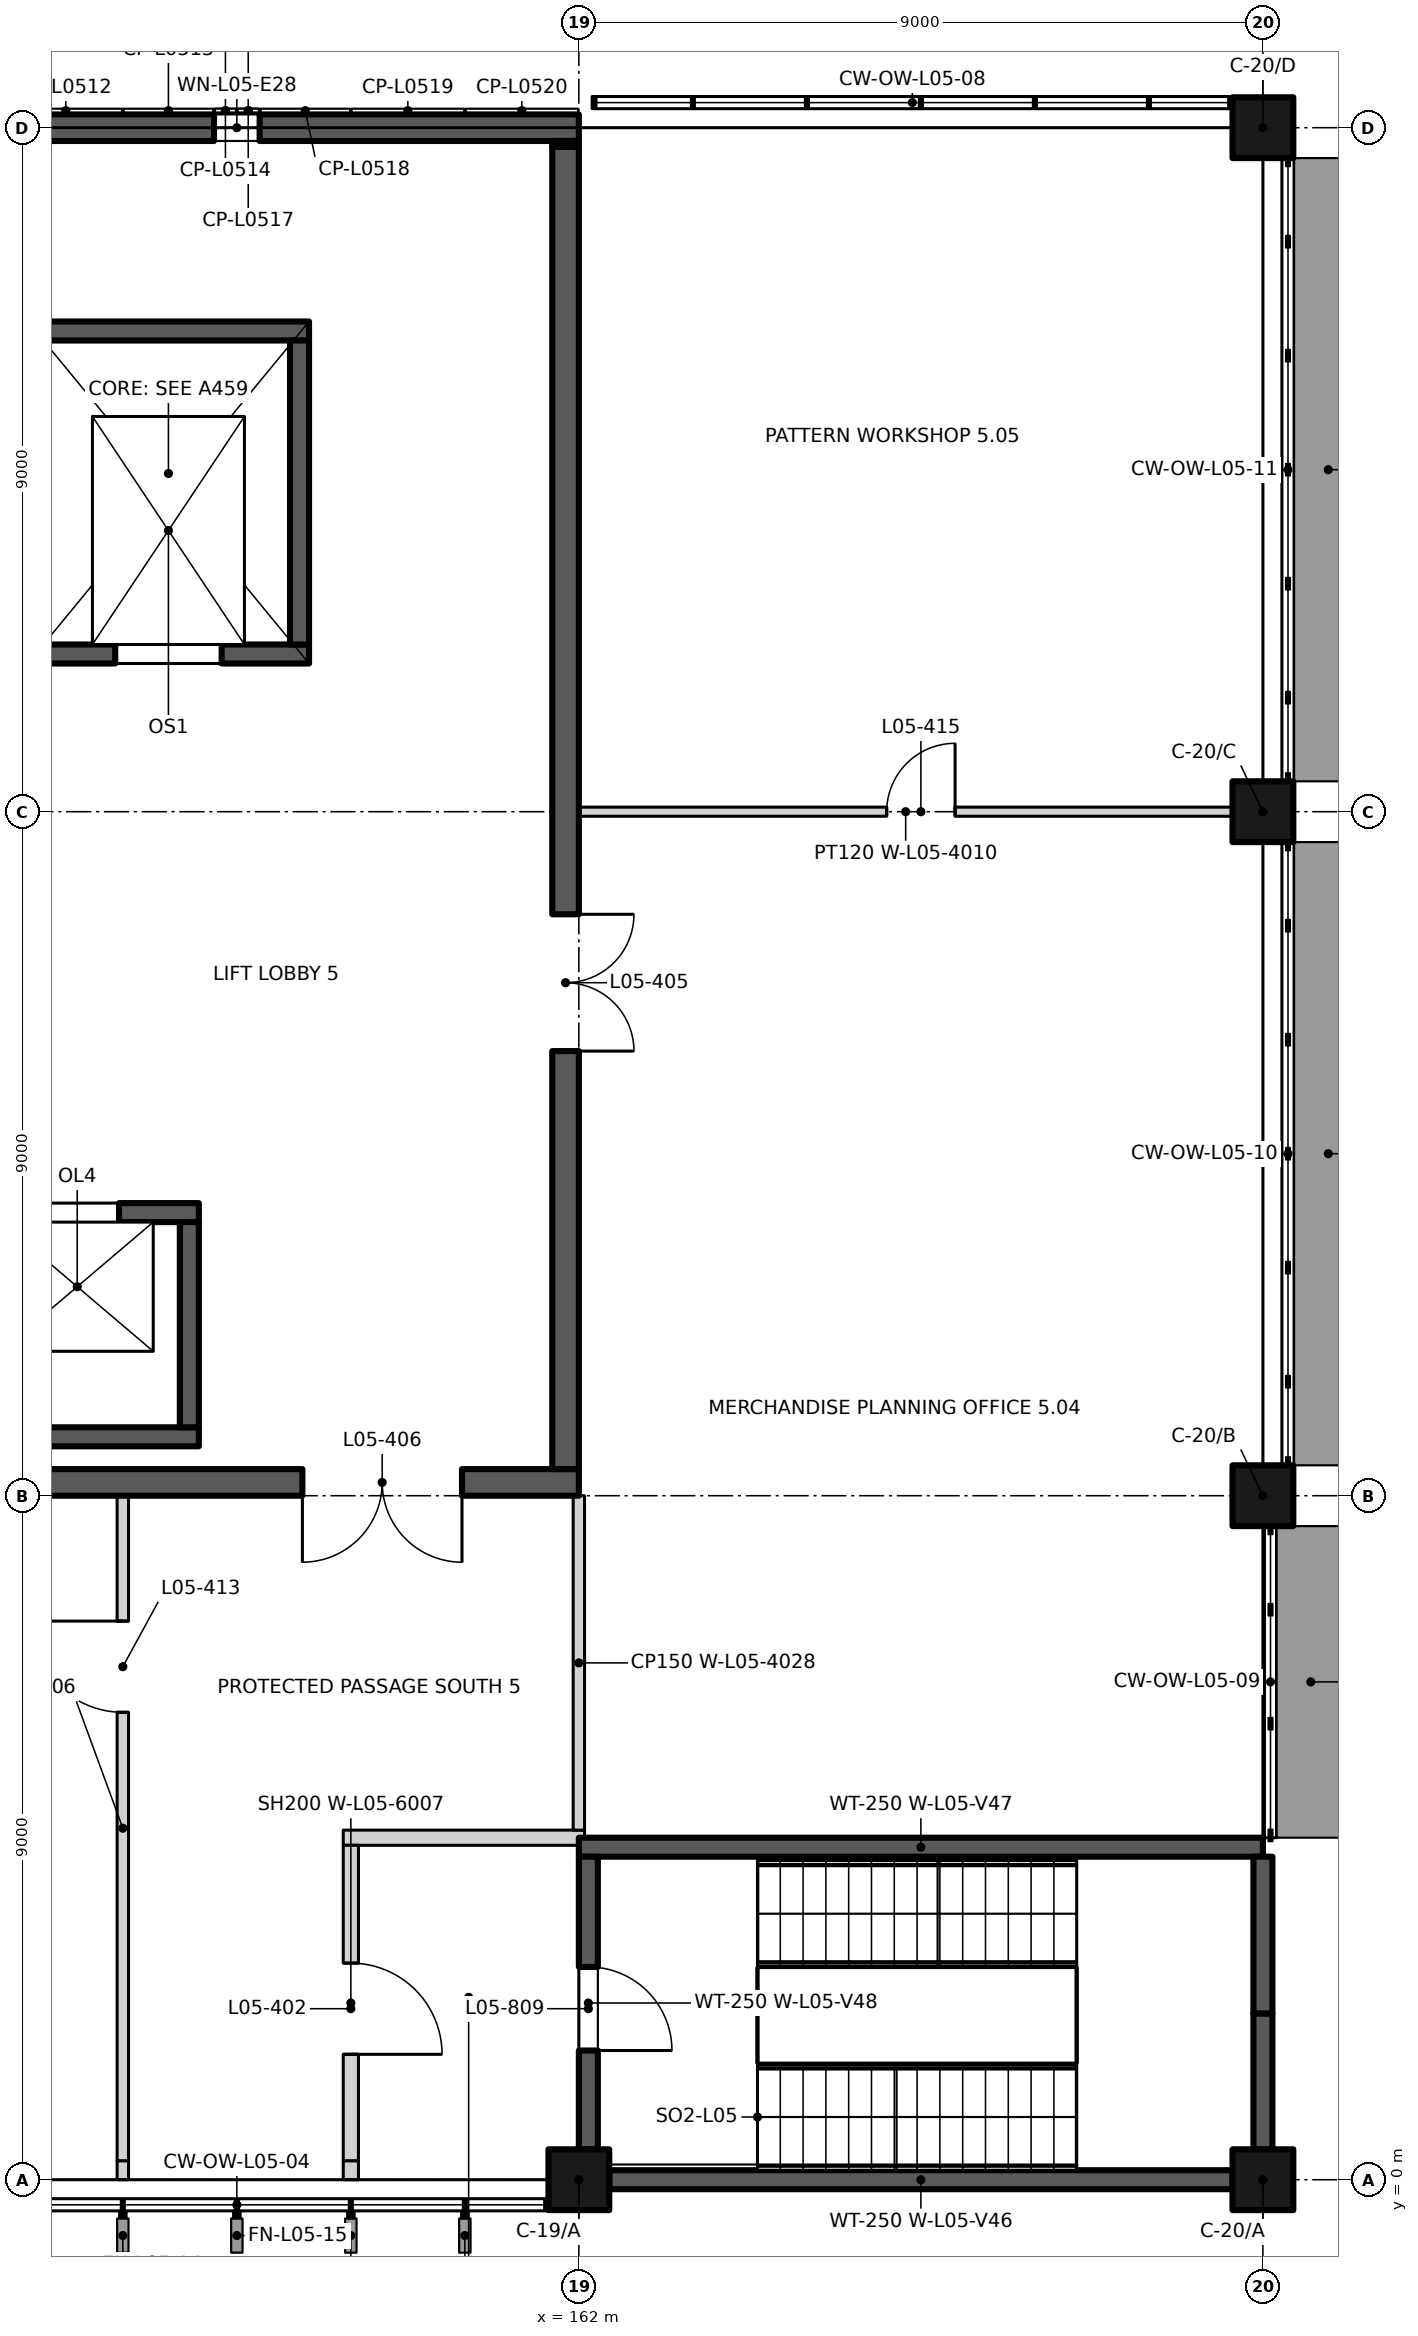
"""IFC4 building model, lengths in metres.
Left out: names, types, materials, properties, quantities, classifications, styles, units other than length and angle.
Written with IfcOpenShell. Run it as: python <this file> out.ifc"""

import sys

from ifc_helpers import new_model, si_unit, direction, frame, frame_2d, origin, origin_2d, place, context, subcontext, project, spatial, rectangle, extrude, element, fill, save


model = new_model("IFC4")
c1 = context("Model", 3, precision=1e-05, world=origin(), true_north=direction((0.0, 1.0)))
c2 = subcontext(c1, "Body", "Model", "MODEL_VIEW")
j1 = project(units=[si_unit("LENGTHUNIT", "METRE"), si_unit("PLANEANGLEUNIT", "RADIAN")], contexts=[c1])
p1 = place(None, origin())
s1 = spatial("IfcSite", under=j1, at=p1, CompositionType="ELEMENT")
p2 = place(p1, origin())
s2 = spatial("IfcBuilding", under=s1, at=p2, CompositionType="ELEMENT")
p3 = place(p2, frame((0.0, 0.0, 24.0)))
s3 = spatial("IfcBuildingStorey", under=s2, at=p3, CompositionType="ELEMENT", Elevation=24.0)
for number, where, z_axis, x_axis in (
    (1, (162.0, 0.0, 0.0), (0.0, 0.0, 1.0), (1.0, 0.0, 0.0)),
    (2, (171.0, 0.0, 0.0), (0.0, 0.0, 1.0), (1.0, 0.0, 0.0)),
    (3, (171.0, 9.0, 0.0), (0.0, 0.0, 1.0), (1.0, 0.0, 0.0)),
    (4, (171.0, 18.0, 0.0), (0.0, 0.0, 1.0), (1.0, 0.0, 0.0)),
    (5, (171.0, 27.0, 0.0), (0.0, 0.0, 1.0), (1.0, 0.0, 0.0)),
):
    element("IfcColumn", number, at=place(p3, frame(where, z_axis=z_axis, x_axis=x_axis)), inside=s3, PredefinedType="COLUMN", context=c2, shape_type="SweptSolid", body=[
        extrude(rectangle(XDim=0.8, YDim=0.8, at=origin_2d()), origin(), (0.0, 0.0, 1.0), 4.5),
    ])
p4 = place(p3, frame((162.4, 0.0, 0.0), z_axis=(0.0, 0.0, 1.0), x_axis=(1.0, 0.0, 0.0)))
e6 = element("IfcWall", 6, at=p4, inside=s3, PredefinedType="SHEAR", context=c2, shape_type="SweptSolid", body=[
    extrude(rectangle(XDim=8.2, YDim=0.25, at=frame_2d((4.1, 0.0))), origin(), (0.0, 0.0, 1.0), 4.5),
])
p5 = place(p3, frame((162.0, 4.375, 0.0), z_axis=(0.0, 0.0, 1.0), x_axis=(1.0, 0.0, 0.0)))
e7 = element("IfcWall", 7, at=p5, inside=s3, PredefinedType="SHEAR", context=c2, shape_type="SweptSolid", body=[
    extrude(rectangle(XDim=9.0, YDim=0.25, at=frame_2d((4.5, 0.0))), origin(), (0.0, 0.0, 1.0), 4.5),
])
p6 = place(p3, frame((162.125, 0.4, 0.0), z_axis=(0.0, 0.0, 1.0), x_axis=(0.0, 1.0, 0.0)))
e8 = element("IfcWall", 8, at=p6, inside=s3, PredefinedType="SHEAR", context=c2, shape_type="SweptSolid", body=[
    extrude(rectangle(XDim=3.85, YDim=0.25, at=frame_2d((1.925, 0.0))), origin(), (0.0, 0.0, 1.0), 4.5),
])
p7 = place(p6, frame((2.4, 0.0, 0.0), z_axis=(0.0, 0.0, 1.0), x_axis=(-1.0, 0.0, 0.0)))
e9 = element("IfcOpeningElement", 9, at=p7, cuts=e8, PredefinedType="OPENING", context=c2, shape_type="SweptSolid", body=[
    extrude(rectangle(XDim=1.1, YDim=2.1, at=frame_2d((0.55, 1.05))), frame((0.0, 0.135, 0.0), z_axis=(0.0, -1.0, 0.0), x_axis=(1.0, 0.0, 0.0)), (0.0, 0.0, 1.0), 0.27),
])
p8 = place(p3, frame((171.0, 0.4, 0.0), z_axis=(0.0, 0.0, 1.0), x_axis=(0.0, 1.0, 0.0)))
e10 = element("IfcWall", 10, at=p8, inside=s3, PredefinedType="SHEAR", context=c2, shape_type="SweptSolid", body=[
    extrude(rectangle(XDim=1.788, YDim=0.25, at=frame_2d((0.894, 0.0))), origin(), (0.0, 0.0, 1.0), 4.5),
])
p9 = place(p3, frame((171.0, 2.188, 0.0), z_axis=(0.0, 0.0, 1.0), x_axis=(0.0, 1.0, 0.0)))
e11 = element("IfcWall", 11, at=p9, inside=s3, PredefinedType="SHEAR", context=c2, shape_type="SweptSolid", body=[
    extrude(rectangle(XDim=2.062, YDim=0.25, at=frame_2d((1.031, 0.0))), origin(), (0.0, 0.0, 1.0), 4.5),
])
p10 = place(p3, frame((144.95, 12.725, 0.0), z_axis=(0.0, 0.0, 1.0), x_axis=(1.0, 0.0, 0.0)))
e12 = element("IfcWall", 12, at=p10, inside=s3, PredefinedType="SHEAR", context=c2, shape_type="SweptSolid", body=[
    extrude(rectangle(XDim=12.05, YDim=0.25, at=frame_2d((6.025, 0.0))), origin(), (0.0, 0.0, 1.0), 4.5),
])
p11 = place(p10, frame((1.05, 0.0, 0.0)))
e13 = element("IfcOpeningElement", 13, at=p11, cuts=e12, PredefinedType="OPENING", context=c2, shape_type="SweptSolid", body=[
    extrude(rectangle(XDim=1.1, YDim=2.1, at=frame_2d((0.55, 1.05))), frame((0.0, 0.135, 0.0), z_axis=(0.0, -1.0, 0.0), x_axis=(1.0, 0.0, 0.0)), (0.0, 0.0, 1.0), 0.27),
])
p12 = place(p10, frame((4.0, 0.0, 0.0)))
e14 = element("IfcOpeningElement", 14, at=p12, cuts=e12, PredefinedType="OPENING", context=c2, shape_type="SweptSolid", body=[
    extrude(rectangle(XDim=1.1, YDim=2.1, at=frame_2d((0.55, 1.05))), frame((0.0, 0.135, 0.0), z_axis=(0.0, -1.0, 0.0), x_axis=(1.0, 0.0, 0.0)), (0.0, 0.0, 1.0), 0.27),
])
p13 = place(p10, frame((6.95, 0.0, 0.0)))
e15 = element("IfcOpeningElement", 15, at=p13, cuts=e12, PredefinedType="OPENING", context=c2, shape_type="SweptSolid", body=[
    extrude(rectangle(XDim=1.1, YDim=2.1, at=frame_2d((0.55, 1.05))), frame((0.0, 0.135, 0.0), z_axis=(0.0, -1.0, 0.0), x_axis=(1.0, 0.0, 0.0)), (0.0, 0.0, 1.0), 0.27),
])
p14 = place(p10, frame((9.9, 0.0, 0.0)))
e16 = element("IfcOpeningElement", 16, at=p14, cuts=e12, PredefinedType="OPENING", context=c2, shape_type="SweptSolid", body=[
    extrude(rectangle(XDim=1.1, YDim=2.1, at=frame_2d((0.55, 1.05))), frame((0.0, 0.135, 0.0), z_axis=(0.0, -1.0, 0.0), x_axis=(1.0, 0.0, 0.0)), (0.0, 0.0, 1.0), 0.27),
])
p15 = place(p3, frame((144.95, 9.775, 0.0), z_axis=(0.0, 0.0, 1.0), x_axis=(1.0, 0.0, 0.0)))
e17 = element("IfcWall", 17, at=p15, inside=s3, PredefinedType="SHEAR", context=c2, shape_type="SweptSolid", body=[
    extrude(rectangle(XDim=12.05, YDim=0.25, at=frame_2d((6.025, 0.0))), origin(), (0.0, 0.0, 1.0), 4.5),
])
p16 = place(p3, frame((156.875, 9.9, 0.0), z_axis=(0.0, 0.0, 1.0), x_axis=(0.0, 1.0, 0.0)))
e18 = element("IfcWall", 18, at=p16, inside=s3, PredefinedType="SHEAR", context=c2, shape_type="SweptSolid", body=[
    extrude(rectangle(XDim=2.7, YDim=0.25, at=frame_2d((1.35, 0.0))), origin(), (0.0, 0.0, 1.0), 4.5),
])
p17 = place(p3, frame((154.75, 20.075, 0.0), z_axis=(0.0, 0.0, 1.0), x_axis=(1.0, 0.0, 0.0)))
e19 = element("IfcWall", 19, at=p17, inside=s3, PredefinedType="SHEAR", context=c2, shape_type="SweptSolid", body=[
    extrude(rectangle(XDim=3.7, YDim=0.25, at=frame_2d((1.85, 0.0))), origin(), (0.0, 0.0, 1.0), 4.5),
])
p18 = place(p17, frame((1.15, 0.0, 0.0)))
e20 = element("IfcOpeningElement", 20, at=p18, cuts=e19, PredefinedType="OPENING", context=c2, shape_type="SweptSolid", body=[
    extrude(rectangle(XDim=1.4, YDim=2.1, at=frame_2d((0.7, 1.05))), frame((0.0, 0.135, 0.0), z_axis=(0.0, -1.0, 0.0), x_axis=(1.0, 0.0, 0.0)), (0.0, 0.0, 1.0), 0.27),
])
p19 = place(p3, frame((154.75, 24.325, 0.0), z_axis=(0.0, 0.0, 1.0), x_axis=(1.0, 0.0, 0.0)))
e21 = element("IfcWall", 21, at=p19, inside=s3, PredefinedType="SHEAR", context=c2, shape_type="SweptSolid", body=[
    extrude(rectangle(XDim=3.7, YDim=0.25, at=frame_2d((1.85, 0.0))), origin(), (0.0, 0.0, 1.0), 4.5),
])
p20 = place(p3, frame((158.325, 20.2, 0.0), z_axis=(0.0, 0.0, 1.0), x_axis=(0.0, 1.0, 0.0)))
e22 = element("IfcWall", 22, at=p20, inside=s3, PredefinedType="SHEAR", context=c2, shape_type="SweptSolid", body=[
    extrude(rectangle(XDim=4.0, YDim=0.25, at=frame_2d((2.0, 0.0))), origin(), (0.0, 0.0, 1.0), 4.5),
])
p21 = place(p3, frame((144.0, 27.0, 0.0), z_axis=(0.0, 0.0, 1.0), x_axis=(1.0, 0.0, 0.0)))
e23 = element("IfcWall", 23, at=p21, inside=s3, PredefinedType="SOLIDWALL", context=c2, shape_type="SweptSolid", body=[
    extrude(rectangle(XDim=18.0, YDim=0.35, at=frame_2d((9.0, 0.0))), origin(), (0.0, 0.0, 1.0), 3.6),
])
p22 = place(p21, frame((4.2, 0.0, 0.6)))
e24 = element("IfcOpeningElement", 24, at=p22, cuts=e23, PredefinedType="OPENING", context=c2, shape_type="SweptSolid", body=[
    extrude(rectangle(XDim=0.6, YDim=2.4, at=frame_2d((0.3, 1.2))), frame((0.0, 0.185, 0.0), z_axis=(0.0, -1.0, 0.0), x_axis=(1.0, 0.0, 0.0)), (0.0, 0.0, 1.0), 0.37),
])
p23 = place(p21, frame((13.2, 0.0, 0.6)))
e25 = element("IfcOpeningElement", 25, at=p23, cuts=e23, PredefinedType="OPENING", context=c2, shape_type="SweptSolid", body=[
    extrude(rectangle(XDim=0.6, YDim=2.4, at=frame_2d((0.3, 1.2))), frame((0.0, 0.185, 0.0), z_axis=(0.0, -1.0, 0.0), x_axis=(1.0, 0.0, 0.0)), (0.0, 0.0, 1.0), 0.37),
])
p24 = place(p3, frame((158.9, 4.5, 0.0), z_axis=(0.0, 0.0, 1.0), x_axis=(1.0, 0.0, 0.0)))
e26 = element("IfcWall", 26, at=p24, inside=s3, PredefinedType="PARTITIONING", context=c2, shape_type="SweptSolid", body=[
    extrude(rectangle(XDim=3.175, YDim=0.2, at=frame_2d((1.587, 0.0))), origin(), (0.0, 0.0, 1.0), 4.2),
])
p25 = place(p3, frame((144.0, 9.175, 0.0), z_axis=(0.0, 0.0, 1.0), x_axis=(1.0, 0.0, 0.0)))
e27 = element("IfcWall", 27, at=p25, inside=s3, PredefinedType="SHEAR", context=c2, shape_type="SweptSolid", body=[
    extrude(rectangle(XDim=18.0, YDim=0.35, at=frame_2d((9.0, 0.0))), origin(), (0.0, 0.0, 1.0), 4.2),
])
p26 = place(p25, frame((16.463, 0.0, 0.0), z_axis=(0.0, 0.0, 1.0), x_axis=(-1.0, 0.0, 0.0)))
e28 = element("IfcOpeningElement", 28, at=p26, cuts=e27, PredefinedType="OPENING", context=c2, shape_type="SweptSolid", body=[
    extrude(rectangle(XDim=2.1, YDim=2.4, at=frame_2d((1.05, 1.2))), frame((0.0, 0.185, 0.0), z_axis=(0.0, -1.0, 0.0), x_axis=(1.0, 0.0, 0.0)), (0.0, 0.0, 1.0), 0.37),
])
p27 = place(p3, frame((162.0, 18.0, 0.0), z_axis=(0.0, 0.0, 1.0), x_axis=(1.0, 0.0, 0.0)))
e29 = element("IfcWall", 29, at=p27, inside=s3, PredefinedType="PARTITIONING", context=c2, shape_type="SweptSolid", body=[
    extrude(rectangle(XDim=8.6, YDim=0.12, at=frame_2d((4.3, 0.0))), origin(), (0.0, 0.0, 1.0), 4.2),
])
p28 = place(p27, frame((4.05, 0.0, 0.0)))
e30 = element("IfcOpeningElement", 30, at=p28, cuts=e29, PredefinedType="OPENING", context=c2, shape_type="SweptSolid", body=[
    extrude(rectangle(XDim=0.9, YDim=2.1, at=frame_2d((0.45, 1.05))), frame((0.0, 0.07, 0.0), z_axis=(0.0, -1.0, 0.0), x_axis=(1.0, 0.0, 0.0)), (0.0, 0.0, 1.0), 0.14),
])
p29 = place(p3, frame((156.0, 0.0, 0.0), z_axis=(0.0, 0.0, 1.0), x_axis=(0.0, 1.0, 0.0)))
e31 = element("IfcWall", 31, at=p29, inside=s3, PredefinedType="PARTITIONING", context=c2, shape_type="SweptSolid", body=[
    extrude(rectangle(XDim=0.25, YDim=0.15, at=frame_2d((0.125, 0.0))), origin(), (0.0, 0.0, 1.0), 3.6),
])
p30 = place(p3, frame((156.0, 0.25, 0.0), z_axis=(0.0, 0.0, 1.0), x_axis=(0.0, 1.0, 0.0)))
e32 = element("IfcWall", 32, at=p30, inside=s3, PredefinedType="PARTITIONING", context=c2, shape_type="SweptSolid", body=[
    extrude(rectangle(XDim=8.75, YDim=0.15, at=frame_2d((4.375, 0.0))), origin(), (0.0, 0.0, 1.0), 4.2),
])
p31 = place(p30, frame((5.9, 0.0, 0.0)))
e33 = element("IfcOpeningElement", 33, at=p31, cuts=e32, PredefinedType="OPENING", context=c2, shape_type="SweptSolid", body=[
    extrude(rectangle(XDim=1.2, YDim=2.1, at=frame_2d((0.6, 1.05))), frame((0.0, 0.085, 0.0), z_axis=(0.0, -1.0, 0.0), x_axis=(1.0, 0.0, 0.0)), (0.0, 0.0, 1.0), 0.17),
])
p32 = place(p3, frame((159.0, 0.0, 0.0), z_axis=(0.0, 0.0, 1.0), x_axis=(0.0, 1.0, 0.0)))
e34 = element("IfcWall", 34, at=p32, inside=s3, PredefinedType="PARTITIONING", context=c2, shape_type="SweptSolid", body=[
    extrude(rectangle(XDim=0.25, YDim=0.2, at=frame_2d((0.125, 0.0))), origin(), (0.0, 0.0, 1.0), 3.6),
])
p33 = place(p3, frame((159.0, 0.25, 0.0), z_axis=(0.0, 0.0, 1.0), x_axis=(0.0, 1.0, 0.0)))
e35 = element("IfcWall", 35, at=p33, inside=s3, PredefinedType="PARTITIONING", context=c2, shape_type="SweptSolid", body=[
    extrude(rectangle(XDim=4.15, YDim=0.2, at=frame_2d((2.075, 0.0))), origin(), (0.0, 0.0, 1.0), 4.2),
])
p34 = place(p33, frame((2.6, 0.0, 0.0), z_axis=(0.0, 0.0, 1.0), x_axis=(-1.0, 0.0, 0.0)))
e36 = element("IfcOpeningElement", 36, at=p34, cuts=e35, PredefinedType="OPENING", context=c2, shape_type="SweptSolid", body=[
    extrude(rectangle(XDim=1.2, YDim=2.1, at=frame_2d((0.6, 1.05))), frame((0.0, 0.11, 0.0), z_axis=(0.0, -1.0, 0.0), x_axis=(1.0, 0.0, 0.0)), (0.0, 0.0, 1.0), 0.22),
])
p35 = place(p3, frame((161.825, 9.35, 0.0), z_axis=(0.0, 0.0, 1.0), x_axis=(0.0, 1.0, 0.0)))
e37 = element("IfcWall", 37, at=p35, inside=s3, PredefinedType="SHEAR", context=c2, shape_type="SweptSolid", body=[
    extrude(rectangle(XDim=17.4, YDim=0.35, at=frame_2d((8.7, 0.0))), origin(), (0.0, 0.0, 1.0), 4.2),
])
p36 = place(p35, frame((7.3, 0.0, 0.0), z_axis=(0.0, 0.0, 1.0), x_axis=(-1.0, 0.0, 0.0)))
e38 = element("IfcOpeningElement", 38, at=p36, cuts=e37, PredefinedType="OPENING", context=c2, shape_type="SweptSolid", body=[
    extrude(rectangle(XDim=1.8, YDim=2.4, at=frame_2d((0.9, 1.2))), frame((0.0, 0.185, 0.0), z_axis=(0.0, -1.0, 0.0), x_axis=(1.0, 0.0, 0.0)), (0.0, 0.0, 1.0), 0.37),
])
p37 = place(p3, frame((161.825, 26.75, 0.0), z_axis=(0.0, 0.0, 1.0), x_axis=(0.0, 1.0, 0.0)))
e39 = element("IfcWall", 39, at=p37, inside=s3, PredefinedType="SHEAR", context=c2, shape_type="SweptSolid", body=[
    extrude(rectangle(XDim=0.075, YDim=0.35, at=frame_2d((0.038, 0.0))), origin(), (0.0, 0.0, 1.0), 3.6),
])
p38 = place(p3, frame((162.0, 4.6, 0.0), z_axis=(0.0, 0.0, 1.0), x_axis=(0.0, 1.0, 0.0)))
e40 = element("IfcWall", 40, at=p38, inside=s3, PredefinedType="PARTITIONING", context=c2, shape_type="SweptSolid", body=[
    extrude(rectangle(XDim=4.4, YDim=0.15, at=frame_2d((2.2, 0.0))), origin(), (0.0, 0.0, 1.0), 4.2),
])
p39 = place(p7, origin())
e41 = element("IfcDoor", 41, at=p39, inside=s3, OperationType="SINGLE_SWING_RIGHT", PredefinedType="DOOR", context=c2, shape_type="SweptSolid", body=[
    extrude(rectangle(XDim=1.1, YDim=2.1, at=frame_2d((0.55, 1.05))), frame((0.0, 0.025, 0.0), z_axis=(0.0, -1.0, 0.0), x_axis=(1.0, 0.0, 0.0)), (0.0, 0.0, 1.0), 0.05),
])
fill(e9, e41)
p40 = place(p14, origin())
e42 = element("IfcDoor", 42, at=p40, inside=s3, OperationType="DOUBLE_DOOR_SLIDING", PredefinedType="DOOR", context=c2, shape_type="SweptSolid", body=[
    extrude(rectangle(XDim=1.1, YDim=2.1, at=frame_2d((0.55, 1.05))), frame((0.0, 0.025, 0.0), z_axis=(0.0, -1.0, 0.0), x_axis=(1.0, 0.0, 0.0)), (0.0, 0.0, 1.0), 0.05),
])
fill(e16, e42)
p41 = place(p18, origin())
e43 = element("IfcDoor", 43, at=p41, inside=s3, OperationType="DOUBLE_DOOR_SLIDING", PredefinedType="DOOR", context=c2, shape_type="SweptSolid", body=[
    extrude(rectangle(XDim=1.4, YDim=2.1, at=frame_2d((0.7, 1.05))), frame((0.0, 0.025, 0.0), z_axis=(0.0, -1.0, 0.0), x_axis=(1.0, 0.0, 0.0)), (0.0, 0.0, 1.0), 0.05),
])
fill(e20, e43)
p42 = place(p23, origin())
e44 = element("IfcWindow", 44, at=p42, inside=s3, PartitioningType="SINGLE_PANEL", PredefinedType="WINDOW", context=c2, shape_type="SweptSolid", body=[
    extrude(rectangle(XDim=0.6, YDim=2.4, at=frame_2d((0.3, 1.2))), frame((0.0, -0.005, 0.0), z_axis=(0.0, -1.0, 0.0), x_axis=(1.0, 0.0, 0.0)), (0.0, 0.0, 1.0), 0.06),
])
fill(e25, e44)
p43 = place(p34, origin())
e45 = element("IfcDoor", 45, at=p43, inside=s3, OperationType="SINGLE_SWING_RIGHT", PredefinedType="DOOR", context=c2, shape_type="SweptSolid", body=[
    extrude(rectangle(XDim=1.2, YDim=2.1, at=frame_2d((0.6, 1.05))), frame((0.0, 0.025, 0.0), z_axis=(0.0, -1.0, 0.0), x_axis=(1.0, 0.0, 0.0)), (0.0, 0.0, 1.0), 0.05),
])
fill(e36, e45)
p44 = place(p36, origin())
e46 = element("IfcDoor", 46, at=p44, inside=s3, OperationType="DOUBLE_DOOR_SINGLE_SWING", PredefinedType="DOOR", context=c2, shape_type="SweptSolid", body=[
    extrude(rectangle(XDim=1.8, YDim=2.4, at=frame_2d((0.9, 1.2))), frame((0.0, 0.025, 0.0), z_axis=(0.0, -1.0, 0.0), x_axis=(1.0, 0.0, 0.0)), (0.0, 0.0, 1.0), 0.05),
])
fill(e38, e46)
p45 = place(p26, origin())
e47 = element("IfcDoor", 47, at=p45, inside=s3, OperationType="DOUBLE_DOOR_SINGLE_SWING", PredefinedType="DOOR", context=c2, shape_type="SweptSolid", body=[
    extrude(rectangle(XDim=2.1, YDim=2.4, at=frame_2d((1.05, 1.2))), frame((0.0, 0.025, 0.0), z_axis=(0.0, -1.0, 0.0), x_axis=(1.0, 0.0, 0.0)), (0.0, 0.0, 1.0), 0.05),
])
fill(e28, e47)
p46 = place(p31, origin())
e48 = element("IfcDoor", 48, at=p46, inside=s3, OperationType="SINGLE_SWING_RIGHT", PredefinedType="DOOR", context=c2, shape_type="SweptSolid", body=[
    extrude(rectangle(XDim=1.2, YDim=2.1, at=frame_2d((0.6, 1.05))), frame((0.0, 0.025, 0.0), z_axis=(0.0, -1.0, 0.0), x_axis=(1.0, 0.0, 0.0)), (0.0, 0.0, 1.0), 0.05),
])
fill(e33, e48)
p47 = place(p28, origin())
e49 = element("IfcDoor", 49, at=p47, inside=s3, OperationType="SINGLE_SWING_RIGHT", PredefinedType="DOOR", context=c2, shape_type="SweptSolid", body=[
    extrude(rectangle(XDim=0.9, YDim=2.1, at=frame_2d((0.45, 1.05))), frame((0.0, 0.025, 0.0), z_axis=(0.0, -1.0, 0.0), x_axis=(1.0, 0.0, 0.0)), (0.0, 0.0, 1.0), 0.05),
])
fill(e30, e49)
save(model, sys.argv[1])
